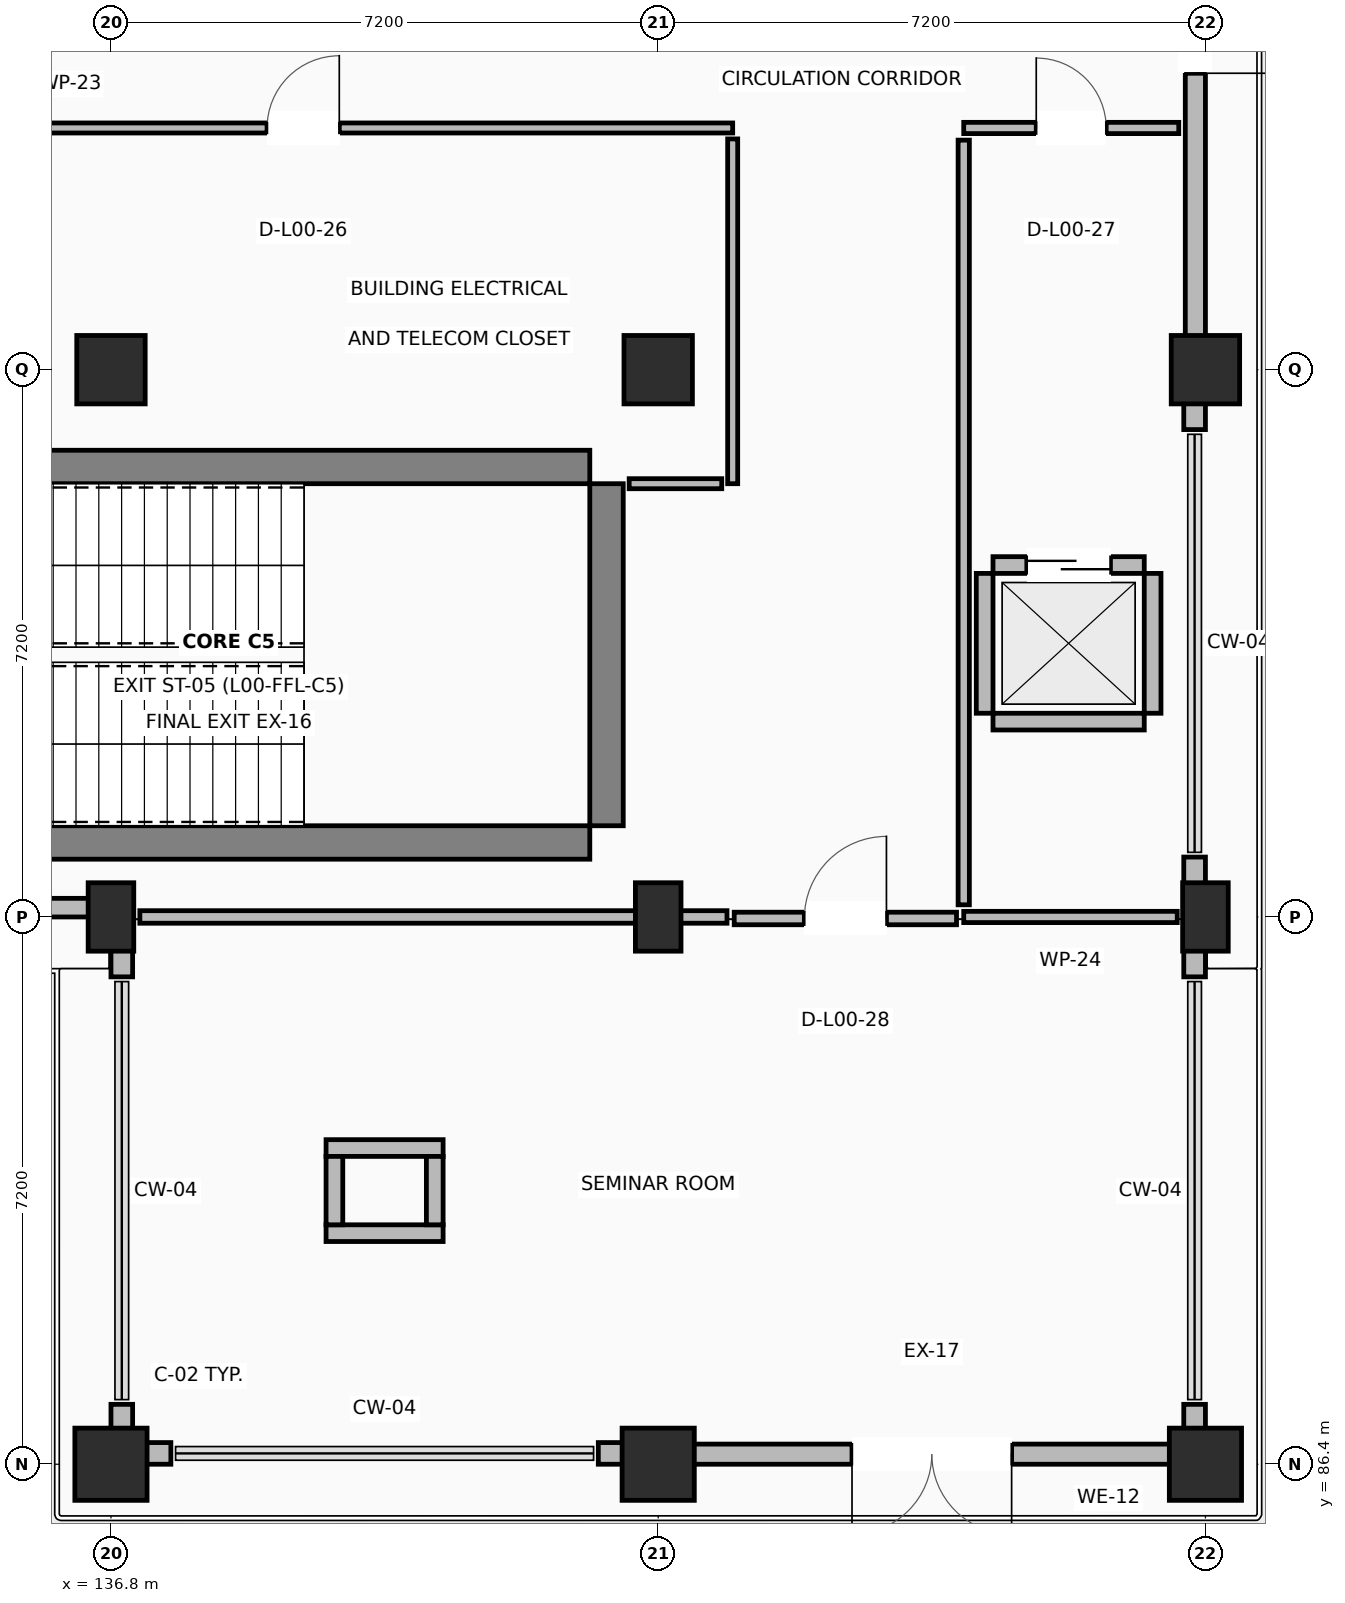
"""IFC4 building model, lengths in metres.
Left out: names, types, materials, properties, quantities, classifications, styles, units other than length and angle.
Written with IfcOpenShell. Run it as: python <this file> out.ifc"""

import sys

from ifc_helpers import new_model, si_unit, direction, frame, frame_2d, origin, origin_2d, place, context, subcontext, project, spatial, rectangle, extrude, element, fill, save


model = new_model("IFC4")
c1 = context("Model", 3, precision=1e-05, world=origin(), true_north=direction((0.0, 1.0)))
c2 = subcontext(c1, "Body", "Model", "MODEL_VIEW")
j1 = project(units=[si_unit("LENGTHUNIT", "METRE"), si_unit("PLANEANGLEUNIT", "RADIAN")], contexts=[c1])
p1 = place(None, origin())
s1 = spatial("IfcSite", under=j1, at=p1, CompositionType="ELEMENT")
p2 = place(p1, origin())
s2 = spatial("IfcBuilding", under=s1, at=p2, CompositionType="ELEMENT")
p3 = place(p2, origin())
s3 = spatial("IfcBuildingStorey", under=s2, at=p3, CompositionType="ELEMENT", Elevation=0.0)
p4 = place(p3, frame((136.8, 86.4, 0.0), z_axis=(0.0, 0.0, 1.0), x_axis=(1.0, 0.0, 0.0)))
e1 = element("IfcColumn", 1, at=p4, inside=s3, PredefinedType="COLUMN", context=c2, shape_type="SweptSolid", body=[
    extrude(rectangle(XDim=0.95, YDim=0.95, at=origin_2d()), origin(), (0.0, 0.0, 1.0), 4.22),
])
p5 = place(p3, frame((136.8, 93.6, 0.0), z_axis=(0.0, 0.0, 1.0), x_axis=(1.0, 0.0, 0.0)))
e2 = element("IfcColumn", 2, at=p5, inside=s3, PredefinedType="COLUMN", context=c2, shape_type="SweptSolid", body=[
    extrude(rectangle(XDim=0.6, YDim=0.9, at=origin_2d()), origin(), (0.0, 0.0, 1.0), 4.22),
])
p6 = place(p3, frame((136.8, 100.8, 0.0), z_axis=(0.0, 0.0, 1.0), x_axis=(1.0, 0.0, 0.0)))
e3 = element("IfcColumn", 3, at=p6, inside=s3, PredefinedType="COLUMN", context=c2, shape_type="SweptSolid", body=[
    extrude(rectangle(XDim=0.9, YDim=0.9, at=origin_2d()), origin(), (0.0, 0.0, 1.0), 4.22),
])
p7 = place(p3, frame((144.0, 86.4, 0.0), z_axis=(0.0, 0.0, 1.0), x_axis=(1.0, 0.0, 0.0)))
e4 = element("IfcColumn", 4, at=p7, inside=s3, PredefinedType="COLUMN", context=c2, shape_type="SweptSolid", body=[
    extrude(rectangle(XDim=0.95, YDim=0.95, at=origin_2d()), origin(), (0.0, 0.0, 1.0), 4.22),
])
p8 = place(p3, frame((144.0, 93.6, 0.0), z_axis=(0.0, 0.0, 1.0), x_axis=(1.0, 0.0, 0.0)))
e5 = element("IfcColumn", 5, at=p8, inside=s3, PredefinedType="COLUMN", context=c2, shape_type="SweptSolid", body=[
    extrude(rectangle(XDim=0.6, YDim=0.9, at=origin_2d()), origin(), (0.0, 0.0, 1.0), 4.22),
])
p9 = place(p3, frame((144.0, 100.8, 0.0), z_axis=(0.0, 0.0, 1.0), x_axis=(1.0, 0.0, 0.0)))
e6 = element("IfcColumn", 6, at=p9, inside=s3, PredefinedType="COLUMN", context=c2, shape_type="SweptSolid", body=[
    extrude(rectangle(XDim=0.9, YDim=0.9, at=origin_2d()), origin(), (0.0, 0.0, 1.0), 4.22),
])
p10 = place(p3, frame((151.2, 86.4, 0.0), z_axis=(0.0, 0.0, 1.0), x_axis=(1.0, 0.0, 0.0)))
e7 = element("IfcColumn", 7, at=p10, inside=s3, PredefinedType="COLUMN", context=c2, shape_type="SweptSolid", body=[
    extrude(rectangle(XDim=0.95, YDim=0.95, at=origin_2d()), origin(), (0.0, 0.0, 1.0), 4.22),
])
p11 = place(p3, frame((151.2, 93.6, 0.0), z_axis=(0.0, 0.0, 1.0), x_axis=(1.0, 0.0, 0.0)))
e8 = element("IfcColumn", 8, at=p11, inside=s3, PredefinedType="COLUMN", context=c2, shape_type="SweptSolid", body=[
    extrude(rectangle(XDim=0.6, YDim=0.9, at=origin_2d()), origin(), (0.0, 0.0, 1.0), 4.22),
])
p12 = place(p3, frame((151.2, 100.8, 0.0), z_axis=(0.0, 0.0, 1.0), x_axis=(1.0, 0.0, 0.0)))
e9 = element("IfcColumn", 9, at=p12, inside=s3, PredefinedType="COLUMN", context=c2, shape_type="SweptSolid", body=[
    extrude(rectangle(XDim=0.9, YDim=0.9, at=origin_2d()), origin(), (0.0, 0.0, 1.0), 4.22),
])
for number, where, z_axis, x_axis in (
    (10, (133.6, 94.58, 0.0), (0.0, 0.0, 1.0), (1.0, 0.0, 0.0)),
    (11, (133.6, 99.52, 0.0), (0.0, 0.0, 1.0), (1.0, 0.0, 0.0)),
):
    element("IfcWall", number, at=place(p3, frame(where, z_axis=z_axis, x_axis=x_axis)), inside=s3, PredefinedType="SHEAR", context=c2, shape_type="SweptSolid", body=[
        extrude(rectangle(XDim=9.5, YDim=0.44, at=frame_2d((4.75, 0.0))), origin(), (0.0, 0.0, 1.0), 4.22),
    ])
p13 = place(p3, frame((143.32, 94.8, 0.0), z_axis=(0.0, 0.0, 1.0), x_axis=(0.0, 1.0, 0.0)))
e12 = element("IfcWall", 12, at=p13, inside=s3, PredefinedType="SHEAR", context=c2, shape_type="SweptSolid", body=[
    extrude(rectangle(XDim=4.5, YDim=0.44, at=frame_2d((2.25, 0.0))), origin(), (0.0, 0.0, 1.0), 4.22),
])
p14 = place(p3, frame((136.8, 93.722, 0.0), z_axis=(0.0, 0.0, 1.0), x_axis=(-1.0, 0.0, 0.0)))
e13 = element("IfcWall", 13, at=p14, inside=s3, PredefinedType="STANDARD", context=c2, shape_type="SweptSolid", body=[
    extrude(rectangle(XDim=7.2, YDim=0.245, at=frame_2d((3.6, 0.0))), origin(), (0.0, 0.0, 1.0), 2.6),
])
p15 = place(p14, frame((4.25, 0.0, 0.0)))
e14 = element("IfcOpeningElement", 14, at=p15, cuts=e13, PredefinedType="OPENING", context=c2, shape_type="SweptSolid", body=[
    extrude(rectangle(XDim=2.1, YDim=2.3, at=frame_2d((1.05, 1.15))), frame((0.0, 0.133, 0.0), z_axis=(0.0, -1.0, 0.0), x_axis=(1.0, 0.0, 0.0)), (0.0, 0.0, 1.0), 0.265),
])
p16 = place(p3, frame((136.942, 93.845, 0.0), z_axis=(0.0, 0.0, 1.0), x_axis=(0.0, -1.0, 0.0)))
e15 = element("IfcWall", 15, at=p16, inside=s3, PredefinedType="STANDARD", context=c2, shape_type="SweptSolid", body=[
    extrude(rectangle(XDim=1.033, YDim=0.285, at=frame_2d((0.517, 0.0))), origin(), (0.0, 0.0, 1.0), 2.6),
])
p17 = place(p3, frame((136.942, 87.188, 0.0), z_axis=(0.0, 0.0, 1.0), x_axis=(0.0, -1.0, 0.0)))
e16 = element("IfcWall", 16, at=p17, inside=s3, PredefinedType="STANDARD", context=c2, shape_type="SweptSolid", body=[
    extrude(rectangle(XDim=0.503, YDim=0.285, at=frame_2d((0.251, 0.0))), origin(), (0.0, 0.0, 1.0), 2.6),
])
p18 = place(p3, frame((151.2, 86.532, 0.0), z_axis=(0.0, 0.0, 1.0), x_axis=(-1.0, 0.0, 0.0)))
e17 = element("IfcWall", 17, at=p18, inside=s3, PredefinedType="STANDARD", context=c2, shape_type="SweptSolid", body=[
    extrude(rectangle(XDim=7.2, YDim=0.265, at=frame_2d((3.6, 0.0))), origin(), (0.0, 0.0, 1.0), 2.6),
])
p19 = place(p18, frame((2.55, 0.0, 0.0)))
e18 = element("IfcOpeningElement", 18, at=p19, cuts=e17, PredefinedType="OPENING", context=c2, shape_type="SweptSolid", body=[
    extrude(rectangle(XDim=2.1, YDim=2.3, at=frame_2d((1.05, 1.15))), frame((0.0, 0.142, 0.0), z_axis=(0.0, -1.0, 0.0), x_axis=(1.0, 0.0, 0.0)), (0.0, 0.0, 1.0), 0.285),
])
p20 = place(p3, frame((136.8, 86.542, 0.0), z_axis=(0.0, 0.0, 1.0), x_axis=(1.0, 0.0, 0.0)))
e19 = element("IfcWall", 19, at=p20, inside=s3, PredefinedType="STANDARD", context=c2, shape_type="SweptSolid", body=[
    extrude(rectangle(XDim=0.788, YDim=0.285, at=frame_2d((0.394, 0.0))), origin(), (0.0, 0.0, 1.0), 2.6),
])
p21 = place(p3, frame((143.212, 86.542, 0.0), z_axis=(0.0, 0.0, 1.0), x_axis=(1.0, 0.0, 0.0)))
e20 = element("IfcWall", 20, at=p21, inside=s3, PredefinedType="STANDARD", context=c2, shape_type="SweptSolid", body=[
    extrude(rectangle(XDim=0.788, YDim=0.285, at=frame_2d((0.394, 0.0))), origin(), (0.0, 0.0, 1.0), 2.6),
])
p22 = place(p3, frame((151.058, 86.665, 0.0), z_axis=(0.0, 0.0, 1.0), x_axis=(0.0, 1.0, 0.0)))
e21 = element("IfcWall", 21, at=p22, inside=s3, PredefinedType="STANDARD", context=c2, shape_type="SweptSolid", body=[
    extrude(rectangle(XDim=0.523, YDim=0.285, at=frame_2d((0.261, 0.0))), origin(), (0.0, 0.0, 1.0), 2.6),
])
p23 = place(p3, frame((151.058, 92.812, 0.0), z_axis=(0.0, 0.0, 1.0), x_axis=(0.0, 1.0, 0.0)))
e22 = element("IfcWall", 22, at=p23, inside=s3, PredefinedType="STANDARD", context=c2, shape_type="SweptSolid", body=[
    extrude(rectangle(XDim=0.788, YDim=0.285, at=frame_2d((0.394, 0.0))), origin(), (0.0, 0.0, 1.0), 2.6),
])
p24 = place(p3, frame((151.067, 108.0, 0.0), z_axis=(0.0, 0.0, 1.0), x_axis=(0.0, -1.0, 0.0)))
e23 = element("IfcWall", 23, at=p24, inside=s3, PredefinedType="STANDARD", context=c2, shape_type="SweptSolid", body=[
    extrude(rectangle(XDim=7.2, YDim=0.265, at=frame_2d((3.6, 0.0))), origin(), (0.0, 0.0, 1.0), 2.6),
])
p25 = place(p24, frame((1.2, 0.0, 0.0)))
e24 = element("IfcOpeningElement", 24, at=p25, cuts=e23, PredefinedType="OPENING", context=c2, shape_type="SweptSolid", body=[
    extrude(rectangle(XDim=2.1, YDim=2.3, at=frame_2d((1.05, 1.15))), frame((0.0, 0.142, 0.0), z_axis=(0.0, -1.0, 0.0), x_axis=(1.0, 0.0, 0.0)), (0.0, 0.0, 1.0), 0.285),
])
p26 = place(p3, frame((151.058, 93.6, 0.0), z_axis=(0.0, 0.0, 1.0), x_axis=(0.0, 1.0, 0.0)))
e25 = element("IfcWall", 25, at=p26, inside=s3, PredefinedType="STANDARD", context=c2, shape_type="SweptSolid", body=[
    extrude(rectangle(XDim=0.788, YDim=0.285, at=frame_2d((0.394, 0.0))), origin(), (0.0, 0.0, 1.0), 2.6),
])
p27 = place(p3, frame((151.058, 100.012, 0.0), z_axis=(0.0, 0.0, 1.0), x_axis=(0.0, 1.0, 0.0)))
e26 = element("IfcWall", 26, at=p27, inside=s3, PredefinedType="STANDARD", context=c2, shape_type="SweptSolid", body=[
    extrude(rectangle(XDim=0.788, YDim=0.285, at=frame_2d((0.394, 0.0))), origin(), (0.0, 0.0, 1.0), 2.6),
])
p28 = place(p3, frame((148.405, 96.17, 0.0), z_axis=(0.0, 0.0, 1.0), x_axis=(1.0, 0.0, 0.0)))
e27 = element("IfcWall", 27, at=p28, inside=s3, PredefinedType="STANDARD", context=c2, shape_type="SweptSolid", body=[
    extrude(rectangle(XDim=1.99, YDim=0.22, at=frame_2d((0.995, 0.0))), origin(), (0.0, 0.0, 1.0), 2.6),
])
p29 = place(p3, frame((148.405, 98.23, 0.0), z_axis=(0.0, 0.0, 1.0), x_axis=(1.0, 0.0, 0.0)))
e28 = element("IfcWall", 28, at=p29, inside=s3, PredefinedType="STANDARD", context=c2, shape_type="SweptSolid", body=[
    extrude(rectangle(XDim=1.99, YDim=0.22, at=frame_2d((0.995, 0.0))), origin(), (0.0, 0.0, 1.0), 2.6),
])
p30 = place(p29, frame((0.445, 0.0, 0.0)))
e29 = element("IfcOpeningElement", 29, at=p30, cuts=e28, PredefinedType="OPENING", context=c2, shape_type="SweptSolid", body=[
    extrude(rectangle(XDim=1.1, YDim=2.15, at=frame_2d((0.55, 1.075))), frame((0.0, 0.12, 0.0), z_axis=(0.0, -1.0, 0.0), x_axis=(1.0, 0.0, 0.0)), (0.0, 0.0, 1.0), 0.24),
])
for number, where, z_axis, x_axis in (
    (30, (148.295, 96.28, 0.0), (0.0, 0.0, 1.0), (0.0, 1.0, 0.0)),
    (31, (150.505, 96.28, 0.0), (0.0, 0.0, 1.0), (0.0, 1.0, 0.0)),
):
    element("IfcWall", number, at=place(p3, frame(where, z_axis=z_axis, x_axis=x_axis)), inside=s3, PredefinedType="STANDARD", context=c2, shape_type="SweptSolid", body=[
        extrude(rectangle(XDim=1.84, YDim=0.22, at=frame_2d((0.92, 0.0))), origin(), (0.0, 0.0, 1.0), 2.6),
    ])
for number, where, z_axis, x_axis in (
    (32, (139.63, 89.44, 0.0), (0.0, 0.0, 1.0), (1.0, 0.0, 0.0)),
    (33, (139.63, 90.56, 0.0), (0.0, 0.0, 1.0), (1.0, 0.0, 0.0)),
):
    element("IfcWall", number, at=place(p3, frame(where, z_axis=z_axis, x_axis=x_axis)), inside=s3, PredefinedType="STANDARD", context=c2, shape_type="SweptSolid", body=[
        extrude(rectangle(XDim=1.54, YDim=0.22, at=frame_2d((0.77, 0.0))), origin(), (0.0, 0.0, 1.0), 2.6),
    ])
for number, where, z_axis, x_axis in (
    (34, (139.74, 89.55, 0.0), (0.0, 0.0, 1.0), (0.0, 1.0, 0.0)),
    (35, (141.06, 89.55, 0.0), (0.0, 0.0, 1.0), (0.0, 1.0, 0.0)),
):
    element("IfcWall", number, at=place(p3, frame(where, z_axis=z_axis, x_axis=x_axis)), inside=s3, PredefinedType="STANDARD", context=c2, shape_type="SweptSolid", body=[
        extrude(rectangle(XDim=0.9, YDim=0.22, at=frame_2d((0.45, 0.0))), origin(), (0.0, 0.0, 1.0), 2.6),
    ])
p31 = place(p3, frame((133.678, 103.98, 0.0), z_axis=(0.0, 0.0, 1.0), x_axis=(1.0, 0.0, 0.0)))
e36 = element("IfcWall", 36, at=p31, inside=s3, PredefinedType="PARTITIONING", context=c2, shape_type="SweptSolid", body=[
    extrude(rectangle(XDim=11.302, YDim=0.132, at=frame_2d((5.651, 0.0))), origin(), (0.0, 0.0, 1.0), 2.6),
])
p32 = place(p31, frame((5.176, 0.0, 0.0)))
e37 = element("IfcOpeningElement", 37, at=p32, cuts=e36, PredefinedType="OPENING", context=c2, shape_type="SweptSolid", body=[
    extrude(rectangle(XDim=0.95, YDim=2.1, at=frame_2d((0.475, 1.05))), frame((0.0, 0.076, 0.0), z_axis=(0.0, -1.0, 0.0), x_axis=(1.0, 0.0, 0.0)), (0.0, 0.0, 1.0), 0.152),
])
p33 = place(p3, frame((144.98, 103.836, 0.0), z_axis=(0.0, 0.0, 1.0), x_axis=(0.0, -1.0, 0.0)))
e38 = element("IfcWall", 38, at=p33, inside=s3, PredefinedType="PARTITIONING", context=c2, shape_type="SweptSolid", body=[
    extrude(rectangle(XDim=4.536, YDim=0.132, at=frame_2d((2.268, 0.0))), origin(), (0.0, 0.0, 1.0), 2.6),
])
p34 = place(p3, frame((144.836, 99.3, 0.0), z_axis=(0.0, 0.0, 1.0), x_axis=(-1.0, 0.0, 0.0)))
e39 = element("IfcWall", 39, at=p34, inside=s3, PredefinedType="PARTITIONING", context=c2, shape_type="SweptSolid", body=[
    extrude(rectangle(XDim=1.218, YDim=0.132, at=frame_2d((0.609, 0.0))), origin(), (0.0, 0.0, 1.0), 2.6),
])
p35 = place(p3, frame((148.02, 103.98, 0.0), z_axis=(0.0, 0.0, 1.0), x_axis=(1.0, 0.0, 0.0)))
e40 = element("IfcWall", 40, at=p35, inside=s3, PredefinedType="PARTITIONING", context=c2, shape_type="SweptSolid", body=[
    extrude(rectangle(XDim=2.829, YDim=0.148, at=frame_2d((1.415, 0.0))), origin(), (0.0, 0.0, 1.0), 2.6),
])
p36 = place(p35, frame((0.954, 0.0, 0.0)))
e41 = element("IfcOpeningElement", 41, at=p36, cuts=e40, PredefinedType="OPENING", context=c2, shape_type="SweptSolid", body=[
    extrude(rectangle(XDim=0.92, YDim=2.1, at=frame_2d((0.46, 1.05))), frame((0.0, 0.084, 0.0), z_axis=(0.0, -1.0, 0.0), x_axis=(1.0, 0.0, 0.0)), (0.0, 0.0, 1.0), 0.168),
])
p37 = place(p3, frame((150.829, 93.6, 0.0), z_axis=(0.0, 0.0, 1.0), x_axis=(-1.0, 0.0, 0.0)))
e42 = element("IfcWall", 42, at=p37, inside=s3, PredefinedType="PARTITIONING", context=c2, shape_type="SweptSolid", body=[
    extrude(rectangle(XDim=2.809, YDim=0.148, at=frame_2d((1.405, 0.0))), origin(), (0.0, 0.0, 1.0), 2.6),
])
p38 = place(p3, frame((148.02, 93.76, 0.0), z_axis=(0.0, 0.0, 1.0), x_axis=(0.0, 1.0, 0.0)))
e43 = element("IfcWall", 43, at=p38, inside=s3, PredefinedType="PARTITIONING", context=c2, shape_type="SweptSolid", body=[
    extrude(rectangle(XDim=10.06, YDim=0.148, at=frame_2d((5.03, 0.0))), origin(), (0.0, 0.0, 1.0), 2.6),
])
p39 = place(p3, frame((145.0, 93.58, 0.0), z_axis=(0.0, 0.0, 1.0), x_axis=(1.0, 0.0, 0.0)))
e44 = element("IfcWall", 44, at=p39, inside=s3, PredefinedType="PARTITIONING", context=c2, shape_type="SweptSolid", body=[
    extrude(rectangle(XDim=2.925, YDim=0.165, at=frame_2d((1.462, 0.0))), origin(), (0.0, 0.0, 1.0), 2.6),
])
p40 = place(p39, frame((0.923, 0.0, 0.0)))
e45 = element("IfcOpeningElement", 45, at=p40, cuts=e44, PredefinedType="OPENING", context=c2, shape_type="SweptSolid", body=[
    extrude(rectangle(XDim=1.08, YDim=2.15, at=frame_2d((0.54, 1.075))), frame((0.0, 0.093, 0.0), z_axis=(0.0, -1.0, 0.0), x_axis=(1.0, 0.0, 0.0)), (0.0, 0.0, 1.0), 0.185),
])
p41 = place(p3, frame((137.18, 93.6, 0.0), z_axis=(0.0, 0.0, 1.0), x_axis=(1.0, 0.0, 0.0)))
e46 = element("IfcWall", 46, at=p41, inside=s3, PredefinedType="PARTITIONING", context=c2, shape_type="SweptSolid", body=[
    extrude(rectangle(XDim=7.725, YDim=0.165, at=frame_2d((3.863, 0.0))), origin(), (0.0, 0.0, 1.0), 2.6),
])
p42 = place(p19, origin())
e47 = element("IfcDoor", 47, at=p42, inside=s3, OperationType="DOUBLE_DOOR_SINGLE_SWING", PredefinedType="DOOR", context=c2, shape_type="SweptSolid", body=[
    extrude(rectangle(XDim=2.1, YDim=2.3, at=frame_2d((1.05, 1.15))), frame((0.0, 0.025, 0.0), z_axis=(0.0, -1.0, 0.0), x_axis=(1.0, 0.0, 0.0)), (0.0, 0.0, 1.0), 0.05),
])
fill(e18, e47)
p43 = place(p25, origin())
e48 = element("IfcDoor", 48, at=p43, inside=s3, OperationType="DOUBLE_DOOR_SINGLE_SWING", PredefinedType="DOOR", context=c2, shape_type="SweptSolid", body=[
    extrude(rectangle(XDim=2.1, YDim=2.3, at=frame_2d((1.05, 1.15))), frame((0.0, 0.025, 0.0), z_axis=(0.0, -1.0, 0.0), x_axis=(1.0, 0.0, 0.0)), (0.0, 0.0, 1.0), 0.05),
])
fill(e24, e48)
p44 = place(p30, origin())
e49 = element("IfcDoor", 49, at=p44, inside=s3, OperationType="SLIDING_TO_LEFT", PredefinedType="DOOR", context=c2, shape_type="SweptSolid", body=[
    extrude(rectangle(XDim=1.1, YDim=2.15, at=frame_2d((0.55, 1.075))), frame((0.0, 0.025, 0.0), z_axis=(0.0, -1.0, 0.0), x_axis=(1.0, 0.0, 0.0)), (0.0, 0.0, 1.0), 0.05),
])
fill(e29, e49)
p45 = place(p32, origin())
e50 = element("IfcDoor", 50, at=p45, inside=s3, OperationType="SINGLE_SWING_RIGHT", PredefinedType="DOOR", context=c2, shape_type="SweptSolid", body=[
    extrude(rectangle(XDim=0.95, YDim=2.1, at=frame_2d((0.475, 1.05))), frame((0.0, 0.025, 0.0), z_axis=(0.0, -1.0, 0.0), x_axis=(1.0, 0.0, 0.0)), (0.0, 0.0, 1.0), 0.05),
])
fill(e37, e50)
p46 = place(p36, origin())
e51 = element("IfcDoor", 51, at=p46, inside=s3, OperationType="SINGLE_SWING_LEFT", PredefinedType="DOOR", context=c2, shape_type="SweptSolid", body=[
    extrude(rectangle(XDim=0.92, YDim=2.1, at=frame_2d((0.46, 1.05))), frame((0.0, 0.025, 0.0), z_axis=(0.0, -1.0, 0.0), x_axis=(1.0, 0.0, 0.0)), (0.0, 0.0, 1.0), 0.05),
])
fill(e41, e51)
p47 = place(p40, origin())
e52 = element("IfcDoor", 52, at=p47, inside=s3, OperationType="SINGLE_SWING_RIGHT", PredefinedType="DOOR", context=c2, shape_type="SweptSolid", body=[
    extrude(rectangle(XDim=1.08, YDim=2.15, at=frame_2d((0.54, 1.075))), frame((0.0, 0.025, 0.0), z_axis=(0.0, -1.0, 0.0), x_axis=(1.0, 0.0, 0.0)), (0.0, 0.0, 1.0), 0.05),
])
fill(e45, e52)
save(model, sys.argv[1])
